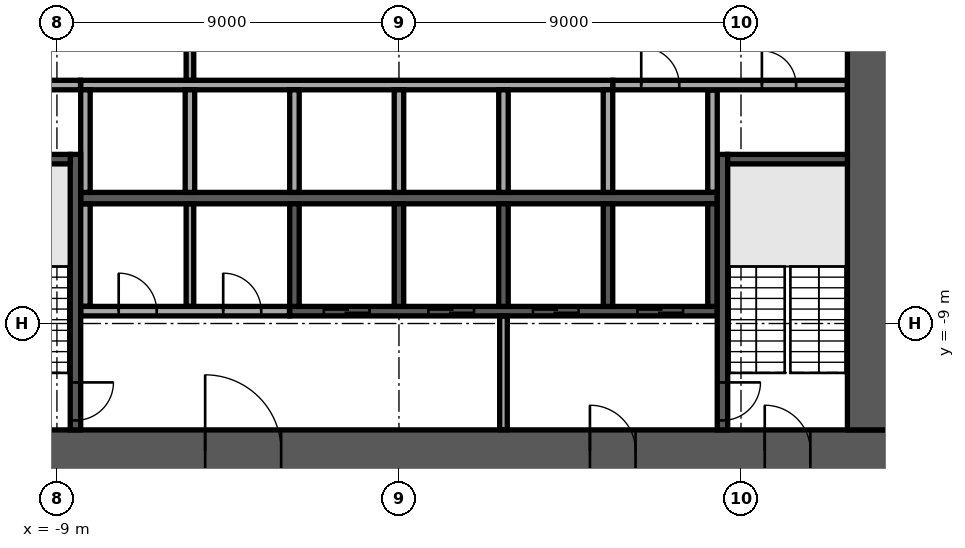
"""IFC4 building model, lengths in metres.
Left out: names, types, materials, properties, quantities, classifications, styles, units other than length and angle.
Written with IfcOpenShell. Run it as: python <this file> out.ifc"""

import sys

from ifc_helpers import new_model, si_unit, direction, frame, frame_2d, origin, place, context, subcontext, project, spatial, rectangle, extrude, element, fill, save


model = new_model("IFC4")
c1 = context("Model", 3, precision=1e-05, world=origin(), true_north=direction((0.0, 1.0)))
c2 = subcontext(c1, "Body", "Model", "MODEL_VIEW")
j1 = project(units=[si_unit("LENGTHUNIT", "METRE"), si_unit("PLANEANGLEUNIT", "RADIAN")], contexts=[c1])
p1 = place(None, origin())
s1 = spatial("IfcSite", under=j1, at=p1, CompositionType="ELEMENT")
p2 = place(p1, origin())
s2 = spatial("IfcBuilding", under=s1, at=p2, CompositionType="ELEMENT")
p3 = place(p2, frame((0.0, 0.0, 86.1)))
s3 = spatial("IfcBuildingStorey", under=s2, at=p3, CompositionType="ELEMENT", Elevation=86.1)
p4 = place(p3, frame((-12.9, -12.35, 0.0), z_axis=(0.0, 0.0, 1.0), x_axis=(1.0, 0.0, 0.0)))
e1 = element("IfcWall", 1, at=p4, inside=s3, PredefinedType="SHEAR", context=c2, shape_type="SweptSolid", body=[
    extrude(rectangle(XDim=25.8, YDim=1.1, at=frame_2d((12.9, 0.0))), origin(), (0.0, 0.0, 1.0), 3.58),
])
p5 = place(p4, frame((7.8, 0.0, 0.0)))
e2 = element("IfcOpeningElement", 2, at=p5, cuts=e1, PredefinedType="OPENING", context=c2, shape_type="SweptSolid", body=[
    extrude(rectangle(XDim=2.0, YDim=2.1, at=frame_2d((1.0, 1.05))), frame((0.0, 0.56, 0.0), z_axis=(0.0, -1.0, 0.0), x_axis=(1.0, 0.0, 0.0)), (0.0, 0.0, 1.0), 1.12),
])
p6 = place(p4, frame((17.925, 0.0, 0.0)))
e3 = element("IfcOpeningElement", 3, at=p6, cuts=e1, PredefinedType="OPENING", context=c2, shape_type="SweptSolid", body=[
    extrude(rectangle(XDim=1.2, YDim=2.1, at=frame_2d((0.6, 1.05))), frame((0.0, 0.56, 0.0), z_axis=(0.0, -1.0, 0.0), x_axis=(1.0, 0.0, 0.0)), (0.0, 0.0, 1.0), 1.12),
])
p7 = place(p4, frame((2.075, 0.0, 0.0)))
e4 = element("IfcOpeningElement", 4, at=p7, cuts=e1, PredefinedType="OPENING", context=c2, shape_type="SweptSolid", body=[
    extrude(rectangle(XDim=1.2, YDim=2.1, at=frame_2d((0.6, 1.05))), frame((0.0, 0.56, 0.0), z_axis=(0.0, -1.0, 0.0), x_axis=(1.0, 0.0, 0.0)), (0.0, 0.0, 1.0), 1.12),
])
p8 = place(p4, frame((22.525, 0.0, 0.0)))
e5 = element("IfcOpeningElement", 5, at=p8, cuts=e1, PredefinedType="OPENING", context=c2, shape_type="SweptSolid", body=[
    extrude(rectangle(XDim=1.2, YDim=2.1, at=frame_2d((0.6, 1.05))), frame((0.0, 0.56, 0.0), z_axis=(0.0, -1.0, 0.0), x_axis=(1.0, 0.0, 0.0)), (0.0, 0.0, 1.0), 1.12),
])
p9 = place(p3, frame((12.35, -11.8, 0.0), z_axis=(0.0, 0.0, 1.0), x_axis=(0.0, 1.0, 0.0)))
e6 = element("IfcWall", 6, at=p9, inside=s3, PredefinedType="SHEAR", context=c2, shape_type="SweptSolid", body=[
    extrude(rectangle(XDim=23.6, YDim=1.1, at=frame_2d((11.8, 0.0))), origin(), (0.0, 0.0, 1.0), 3.58),
])
p10 = place(p9, frame((10.6, 0.0, 0.0)))
e7 = element("IfcOpeningElement", 7, at=p10, cuts=e6, PredefinedType="OPENING", context=c2, shape_type="SweptSolid", body=[
    extrude(rectangle(XDim=2.4, YDim=2.4, at=frame_2d((1.2, 1.2))), frame((0.0, 0.56, 0.0), z_axis=(0.0, -1.0, 0.0), x_axis=(1.0, 0.0, 0.0)), (0.0, 0.0, 1.0), 1.12),
])
p11 = place(p3, frame((-8.375, -5.7, 0.0), z_axis=(0.0, 0.0, 1.0), x_axis=(1.0, 0.0, 0.0)))
e8 = element("IfcWall", 8, at=p11, inside=s3, PredefinedType="SOLIDWALL", context=c2, shape_type="SweptSolid", body=[
    extrude(rectangle(XDim=16.75, YDim=0.3, at=frame_2d((8.375, 0.0))), origin(), (0.0, 0.0, 1.0), 3.58),
])
p12 = place(p3, frame((-8.375, -2.725, 0.0), z_axis=(0.0, 0.0, 1.0), x_axis=(1.0, 0.0, 0.0)))
e9 = element("IfcWall", 9, at=p12, inside=s3, PredefinedType="SOLIDWALL", context=c2, shape_type="SweptSolid", body=[
    extrude(rectangle(XDim=14.0, YDim=0.25, at=frame_2d((7.0, 0.0))), origin(), (0.0, 0.0, 1.0), 3.58),
])
for number, where, z_axis, x_axis in (
    (10, (-8.25, -5.55, 0.0), (0.0, 0.0, 1.0), (0.0, 1.0, 0.0)),
    (11, (-5.5, -5.55, 0.0), (0.0, 0.0, 1.0), (0.0, 1.0, 0.0)),
    (12, (-2.75, -5.55, 0.0), (0.0, 0.0, 1.0), (0.0, 1.0, 0.0)),
    (13, (0.0, -5.55, 0.0), (0.0, 0.0, 1.0), (0.0, 1.0, 0.0)),
    (14, (2.75, -5.55, 0.0), (0.0, 0.0, 1.0), (0.0, 1.0, 0.0)),
    (15, (5.5, -5.55, 0.0), (0.0, 0.0, 1.0), (0.0, 1.0, 0.0)),
):
    element("IfcWall", number, at=place(p3, frame(where, z_axis=z_axis, x_axis=x_axis)), inside=s3, PredefinedType="SOLIDWALL", context=c2, shape_type="SweptSolid", body=[
        extrude(rectangle(XDim=2.7, YDim=0.25, at=frame_2d((1.35, 0.0))), origin(), (0.0, 0.0, 1.0), 3.58),
    ])
p13 = place(p3, frame((-2.875, -8.675, 0.0), z_axis=(0.0, 0.0, 1.0), x_axis=(1.0, 0.0, 0.0)))
e16 = element("IfcWall", 16, at=p13, inside=s3, PredefinedType="SOLIDWALL", context=c2, shape_type="SweptSolid", body=[
    extrude(rectangle(XDim=11.25, YDim=0.25, at=frame_2d((5.625, 0.0))), origin(), (0.0, 0.0, 1.0), 3.58),
])
p14 = place(p13, frame((0.9, 0.0, 0.0)))
e17 = element("IfcOpeningElement", 17, at=p14, cuts=e16, PredefinedType="OPENING", context=c2, shape_type="SweptSolid", body=[
    extrude(rectangle(XDim=1.2, YDim=2.1, at=frame_2d((0.6, 1.05))), frame((0.0, 0.135, 0.0), z_axis=(0.0, -1.0, 0.0), x_axis=(1.0, 0.0, 0.0)), (0.0, 0.0, 1.0), 0.27),
])
p15 = place(p13, frame((3.65, 0.0, 0.0)))
e18 = element("IfcOpeningElement", 18, at=p15, cuts=e16, PredefinedType="OPENING", context=c2, shape_type="SweptSolid", body=[
    extrude(rectangle(XDim=1.2, YDim=2.1, at=frame_2d((0.6, 1.05))), frame((0.0, 0.135, 0.0), z_axis=(0.0, -1.0, 0.0), x_axis=(1.0, 0.0, 0.0)), (0.0, 0.0, 1.0), 0.27),
])
p16 = place(p13, frame((6.4, 0.0, 0.0)))
e19 = element("IfcOpeningElement", 19, at=p16, cuts=e16, PredefinedType="OPENING", context=c2, shape_type="SweptSolid", body=[
    extrude(rectangle(XDim=1.2, YDim=2.1, at=frame_2d((0.6, 1.05))), frame((0.0, 0.135, 0.0), z_axis=(0.0, -1.0, 0.0), x_axis=(1.0, 0.0, 0.0)), (0.0, 0.0, 1.0), 0.27),
])
p17 = place(p13, frame((9.15, 0.0, 0.0)))
e20 = element("IfcOpeningElement", 20, at=p17, cuts=e16, PredefinedType="OPENING", context=c2, shape_type="SweptSolid", body=[
    extrude(rectangle(XDim=1.2, YDim=2.1, at=frame_2d((0.6, 1.05))), frame((0.0, 0.135, 0.0), z_axis=(0.0, -1.0, 0.0), x_axis=(1.0, 0.0, 0.0)), (0.0, 0.0, 1.0), 0.27),
])
for number, where, z_axis, x_axis in (
    (21, (-2.75, -8.55, 0.0), (0.0, 0.0, 1.0), (0.0, 1.0, 0.0)),
    (22, (0.0, -8.55, 0.0), (0.0, 0.0, 1.0), (0.0, 1.0, 0.0)),
    (23, (2.75, -8.55, 0.0), (0.0, 0.0, 1.0), (0.0, 1.0, 0.0)),
    (24, (5.5, -8.55, 0.0), (0.0, 0.0, 1.0), (0.0, 1.0, 0.0)),
    (25, (8.25, -8.55, 0.0), (0.0, 0.0, 1.0), (0.0, 1.0, 0.0)),
):
    element("IfcWall", number, at=place(p3, frame(where, z_axis=z_axis, x_axis=x_axis)), inside=s3, PredefinedType="SOLIDWALL", context=c2, shape_type="SweptSolid", body=[
        extrude(rectangle(XDim=2.7, YDim=0.25, at=frame_2d((1.35, 0.0))), origin(), (0.0, 0.0, 1.0), 3.58),
    ])
p18 = place(p3, frame((-8.512, -4.55, 0.0), z_axis=(0.0, 0.0, 1.0), x_axis=(0.0, -1.0, 0.0)))
e26 = element("IfcWall", 26, at=p18, inside=s3, PredefinedType="SOLIDWALL", context=c2, shape_type="SweptSolid", body=[
    extrude(rectangle(XDim=7.25, YDim=0.275, at=frame_2d((3.625, 0.0))), origin(), (0.0, 0.0, 1.0), 3.58),
])
p19 = place(p18, frame((6.0, 0.0, 0.0)))
e27 = element("IfcOpeningElement", 27, at=p19, cuts=e26, PredefinedType="OPENING", context=c2, shape_type="SweptSolid", body=[
    extrude(rectangle(XDim=1.0, YDim=2.1, at=frame_2d((0.5, 1.05))), frame((0.0, 0.147, 0.0), z_axis=(0.0, -1.0, 0.0), x_axis=(1.0, 0.0, 0.0)), (0.0, 0.0, 1.0), 0.295),
])
p20 = place(p3, frame((-8.65, -4.675, 0.0), z_axis=(0.0, 0.0, 1.0), x_axis=(-1.0, 0.0, 0.0)))
e28 = element("IfcWall", 28, at=p20, inside=s3, PredefinedType="SOLIDWALL", context=c2, shape_type="SweptSolid", body=[
    extrude(rectangle(XDim=3.15, YDim=0.25, at=frame_2d((1.575, 0.0))), origin(), (0.0, 0.0, 1.0), 3.58),
])
p21 = place(p3, frame((8.512, -4.55, 0.0), z_axis=(0.0, 0.0, 1.0), x_axis=(0.0, -1.0, 0.0)))
e29 = element("IfcWall", 29, at=p21, inside=s3, PredefinedType="SOLIDWALL", context=c2, shape_type="SweptSolid", body=[
    extrude(rectangle(XDim=7.25, YDim=0.275, at=frame_2d((3.625, 0.0))), origin(), (0.0, 0.0, 1.0), 3.58),
])
p22 = place(p21, frame((6.0, 0.0, 0.0)))
e30 = element("IfcOpeningElement", 30, at=p22, cuts=e29, PredefinedType="OPENING", context=c2, shape_type="SweptSolid", body=[
    extrude(rectangle(XDim=1.0, YDim=2.1, at=frame_2d((0.5, 1.05))), frame((0.0, 0.147, 0.0), z_axis=(0.0, -1.0, 0.0), x_axis=(1.0, 0.0, 0.0)), (0.0, 0.0, 1.0), 0.295),
])
p23 = place(p3, frame((8.65, -4.675, 0.0), z_axis=(0.0, 0.0, 1.0), x_axis=(1.0, 0.0, 0.0)))
e31 = element("IfcWall", 31, at=p23, inside=s3, PredefinedType="SOLIDWALL", context=c2, shape_type="SweptSolid", body=[
    extrude(rectangle(XDim=3.15, YDim=0.25, at=frame_2d((1.575, 0.0))), origin(), (0.0, 0.0, 1.0), 3.58),
])
p24 = place(p3, frame((2.75, -11.795, 0.0), z_axis=(0.0, 0.0, 1.0), x_axis=(0.0, 1.0, 0.0)))
e32 = element("IfcWall", 32, at=p24, inside=s3, PredefinedType="PARTITIONING", context=c2, shape_type="SweptSolid", body=[
    extrude(rectangle(XDim=2.99, YDim=0.2, at=frame_2d((1.495, 0.0))), origin(), (0.0, 0.0, 1.0), 3.58),
])
p25 = place(p3, frame((-8.37, -8.675, 0.0), z_axis=(0.0, 0.0, 1.0), x_axis=(1.0, 0.0, 0.0)))
e33 = element("IfcWall", 33, at=p25, inside=s3, PredefinedType="PARTITIONING", context=c2, shape_type="SweptSolid", body=[
    extrude(rectangle(XDim=5.49, YDim=0.25, at=frame_2d((2.745, 0.0))), origin(), (0.0, 0.0, 1.0), 3.58),
])
p26 = place(p25, frame((0.995, 0.0, 0.0)))
e34 = element("IfcOpeningElement", 34, at=p26, cuts=e33, PredefinedType="OPENING", context=c2, shape_type="SweptSolid", body=[
    extrude(rectangle(XDim=1.0, YDim=2.1, at=frame_2d((0.5, 1.05))), frame((0.0, 0.135, 0.0), z_axis=(0.0, -1.0, 0.0), x_axis=(1.0, 0.0, 0.0)), (0.0, 0.0, 1.0), 0.27),
])
p27 = place(p25, frame((3.745, 0.0, 0.0)))
e35 = element("IfcOpeningElement", 35, at=p27, cuts=e33, PredefinedType="OPENING", context=c2, shape_type="SweptSolid", body=[
    extrude(rectangle(XDim=1.0, YDim=2.1, at=frame_2d((0.5, 1.05))), frame((0.0, 0.135, 0.0), z_axis=(0.0, -1.0, 0.0), x_axis=(1.0, 0.0, 0.0)), (0.0, 0.0, 1.0), 0.27),
])
p28 = place(p3, frame((-8.25, -8.545, 0.0), z_axis=(0.0, 0.0, 1.0), x_axis=(0.0, 1.0, 0.0)))
e36 = element("IfcWall", 36, at=p28, inside=s3, PredefinedType="PARTITIONING", context=c2, shape_type="SweptSolid", body=[
    extrude(rectangle(XDim=2.69, YDim=0.25, at=frame_2d((1.345, 0.0))), origin(), (0.0, 0.0, 1.0), 3.58),
])
p29 = place(p3, frame((-5.5, -8.545, 0.0), z_axis=(0.0, 0.0, 1.0), x_axis=(0.0, 1.0, 0.0)))
e37 = element("IfcWall", 37, at=p29, inside=s3, PredefinedType="PARTITIONING", context=c2, shape_type="SweptSolid", body=[
    extrude(rectangle(XDim=2.69, YDim=0.2, at=frame_2d((1.345, 0.0))), origin(), (0.0, 0.0, 1.0), 3.58),
])
p30 = place(p3, frame((8.25, -5.545, 0.0), z_axis=(0.0, 0.0, 1.0), x_axis=(0.0, 1.0, 0.0)))
e38 = element("IfcWall", 38, at=p30, inside=s3, PredefinedType="PARTITIONING", context=c2, shape_type="SweptSolid", body=[
    extrude(rectangle(XDim=2.69, YDim=0.25, at=frame_2d((1.345, 0.0))), origin(), (0.0, 0.0, 1.0), 3.58),
])
p31 = place(p3, frame((-11.795, -2.725, 0.0), z_axis=(0.0, 0.0, 1.0), x_axis=(1.0, 0.0, 0.0)))
e39 = element("IfcWall", 39, at=p31, inside=s3, PredefinedType="PARTITIONING", context=c2, shape_type="SweptSolid", body=[
    extrude(rectangle(XDim=3.415, YDim=0.25, at=frame_2d((1.708, 0.0))), origin(), (0.0, 0.0, 1.0), 3.58),
])
p32 = place(p31, frame((1.295, 0.0, 0.0)))
e40 = element("IfcOpeningElement", 40, at=p32, cuts=e39, PredefinedType="OPENING", context=c2, shape_type="SweptSolid", body=[
    extrude(rectangle(XDim=1.0, YDim=2.1, at=frame_2d((0.5, 1.05))), frame((0.0, 0.135, 0.0), z_axis=(0.0, -1.0, 0.0), x_axis=(1.0, 0.0, 0.0)), (0.0, 0.0, 1.0), 0.27),
])
p33 = place(p3, frame((5.63, -2.725, 0.0), z_axis=(0.0, 0.0, 1.0), x_axis=(1.0, 0.0, 0.0)))
e41 = element("IfcWall", 41, at=p33, inside=s3, PredefinedType="PARTITIONING", context=c2, shape_type="SweptSolid", body=[
    extrude(rectangle(XDim=6.165, YDim=0.25, at=frame_2d((3.083, 0.0))), origin(), (0.0, 0.0, 1.0), 3.58),
])
p34 = place(p33, frame((0.745, 0.0, 0.0)))
e42 = element("IfcOpeningElement", 42, at=p34, cuts=e41, PredefinedType="OPENING", context=c2, shape_type="SweptSolid", body=[
    extrude(rectangle(XDim=1.0, YDim=2.1, at=frame_2d((0.5, 1.05))), frame((0.0, 0.135, 0.0), z_axis=(0.0, -1.0, 0.0), x_axis=(1.0, 0.0, 0.0)), (0.0, 0.0, 1.0), 0.27),
])
p35 = place(p33, frame((3.92, 0.0, 0.0)))
e43 = element("IfcOpeningElement", 43, at=p35, cuts=e41, PredefinedType="OPENING", context=c2, shape_type="SweptSolid", body=[
    extrude(rectangle(XDim=0.9, YDim=2.1, at=frame_2d((0.45, 1.05))), frame((0.0, 0.135, 0.0), z_axis=(0.0, -1.0, 0.0), x_axis=(1.0, 0.0, 0.0)), (0.0, 0.0, 1.0), 0.27),
])
p36 = place(p3, frame((-5.5, -2.595, 0.0), z_axis=(0.0, 0.0, 1.0), x_axis=(0.0, 1.0, 0.0)))
e44 = element("IfcWall", 44, at=p36, inside=s3, PredefinedType="PARTITIONING", context=c2, shape_type="SweptSolid", body=[
    extrude(rectangle(XDim=5.19, YDim=0.2, at=frame_2d((2.595, 0.0))), origin(), (0.0, 0.0, 1.0), 3.58),
])
p37 = place(p36, frame((1.395, 0.0, 0.0)))
e45 = element("IfcOpeningElement", 45, at=p37, cuts=e44, PredefinedType="OPENING", context=c2, shape_type="SweptSolid", body=[
    extrude(rectangle(XDim=2.4, YDim=2.4, at=frame_2d((1.2, 1.2))), frame((0.0, 0.11, 0.0), z_axis=(0.0, -1.0, 0.0), x_axis=(1.0, 0.0, 0.0)), (0.0, 0.0, 1.0), 0.22),
])
p38 = place(p5, origin())
e46 = element("IfcDoor", 46, at=p38, inside=s3, OperationType="SINGLE_SWING_LEFT", PredefinedType="DOOR", context=c2, shape_type="SweptSolid", body=[
    extrude(rectangle(XDim=2.0, YDim=2.1, at=frame_2d((1.0, 1.05))), frame((0.0, 0.025, 0.0), z_axis=(0.0, -1.0, 0.0), x_axis=(1.0, 0.0, 0.0)), (0.0, 0.0, 1.0), 0.05),
])
fill(e2, e46)
p39 = place(p6, origin())
e47 = element("IfcDoor", 47, at=p39, inside=s3, OperationType="SINGLE_SWING_LEFT", PredefinedType="DOOR", context=c2, shape_type="SweptSolid", body=[
    extrude(rectangle(XDim=1.2, YDim=2.1, at=frame_2d((0.6, 1.05))), frame((0.0, 0.025, 0.0), z_axis=(0.0, -1.0, 0.0), x_axis=(1.0, 0.0, 0.0)), (0.0, 0.0, 1.0), 0.05),
])
fill(e3, e47)
p40 = place(p8, origin())
e48 = element("IfcDoor", 48, at=p40, inside=s3, OperationType="SINGLE_SWING_LEFT", PredefinedType="DOOR", context=c2, shape_type="SweptSolid", body=[
    extrude(rectangle(XDim=1.2, YDim=2.1, at=frame_2d((0.6, 1.05))), frame((0.0, 0.025, 0.0), z_axis=(0.0, -1.0, 0.0), x_axis=(1.0, 0.0, 0.0)), (0.0, 0.0, 1.0), 0.05),
])
fill(e5, e48)
p41 = place(p14, origin())
e49 = element("IfcDoor", 49, at=p41, inside=s3, OperationType="DOUBLE_DOOR_SLIDING", PredefinedType="DOOR", context=c2, shape_type="SweptSolid", body=[
    extrude(rectangle(XDim=1.2, YDim=2.1, at=frame_2d((0.6, 1.05))), frame((0.0, 0.025, 0.0), z_axis=(0.0, -1.0, 0.0), x_axis=(1.0, 0.0, 0.0)), (0.0, 0.0, 1.0), 0.05),
])
fill(e17, e49)
p42 = place(p15, origin())
e50 = element("IfcDoor", 50, at=p42, inside=s3, OperationType="DOUBLE_DOOR_SLIDING", PredefinedType="DOOR", context=c2, shape_type="SweptSolid", body=[
    extrude(rectangle(XDim=1.2, YDim=2.1, at=frame_2d((0.6, 1.05))), frame((0.0, 0.025, 0.0), z_axis=(0.0, -1.0, 0.0), x_axis=(1.0, 0.0, 0.0)), (0.0, 0.0, 1.0), 0.05),
])
fill(e18, e50)
p43 = place(p16, origin())
e51 = element("IfcDoor", 51, at=p43, inside=s3, OperationType="DOUBLE_DOOR_SLIDING", PredefinedType="DOOR", context=c2, shape_type="SweptSolid", body=[
    extrude(rectangle(XDim=1.2, YDim=2.1, at=frame_2d((0.6, 1.05))), frame((0.0, 0.025, 0.0), z_axis=(0.0, -1.0, 0.0), x_axis=(1.0, 0.0, 0.0)), (0.0, 0.0, 1.0), 0.05),
])
fill(e19, e51)
p44 = place(p17, origin())
e52 = element("IfcDoor", 52, at=p44, inside=s3, OperationType="DOUBLE_DOOR_SLIDING", PredefinedType="DOOR", context=c2, shape_type="SweptSolid", body=[
    extrude(rectangle(XDim=1.2, YDim=2.1, at=frame_2d((0.6, 1.05))), frame((0.0, 0.025, 0.0), z_axis=(0.0, -1.0, 0.0), x_axis=(1.0, 0.0, 0.0)), (0.0, 0.0, 1.0), 0.05),
])
fill(e20, e52)
p45 = place(p19, origin())
e53 = element("IfcDoor", 53, at=p45, inside=s3, OperationType="SINGLE_SWING_LEFT", PredefinedType="DOOR", context=c2, shape_type="SweptSolid", body=[
    extrude(rectangle(XDim=1.0, YDim=2.1, at=frame_2d((0.5, 1.05))), frame((0.0, 0.025, 0.0), z_axis=(0.0, -1.0, 0.0), x_axis=(1.0, 0.0, 0.0)), (0.0, 0.0, 1.0), 0.05),
])
fill(e27, e53)
p46 = place(p22, origin())
e54 = element("IfcDoor", 54, at=p46, inside=s3, OperationType="SINGLE_SWING_LEFT", PredefinedType="DOOR", context=c2, shape_type="SweptSolid", body=[
    extrude(rectangle(XDim=1.0, YDim=2.1, at=frame_2d((0.5, 1.05))), frame((0.0, 0.025, 0.0), z_axis=(0.0, -1.0, 0.0), x_axis=(1.0, 0.0, 0.0)), (0.0, 0.0, 1.0), 0.05),
])
fill(e30, e54)
p47 = place(p26, origin())
e55 = element("IfcDoor", 55, at=p47, inside=s3, OperationType="SINGLE_SWING_RIGHT", PredefinedType="DOOR", context=c2, shape_type="SweptSolid", body=[
    extrude(rectangle(XDim=1.0, YDim=2.1, at=frame_2d((0.5, 1.05))), frame((0.0, 0.025, 0.0), z_axis=(0.0, -1.0, 0.0), x_axis=(1.0, 0.0, 0.0)), (0.0, 0.0, 1.0), 0.05),
])
fill(e34, e55)
p48 = place(p27, origin())
e56 = element("IfcDoor", 56, at=p48, inside=s3, OperationType="SINGLE_SWING_RIGHT", PredefinedType="DOOR", context=c2, shape_type="SweptSolid", body=[
    extrude(rectangle(XDim=1.0, YDim=2.1, at=frame_2d((0.5, 1.05))), frame((0.0, 0.025, 0.0), z_axis=(0.0, -1.0, 0.0), x_axis=(1.0, 0.0, 0.0)), (0.0, 0.0, 1.0), 0.05),
])
fill(e35, e56)
p49 = place(p34, origin())
e57 = element("IfcDoor", 57, at=p49, inside=s3, OperationType="SINGLE_SWING_RIGHT", PredefinedType="DOOR", context=c2, shape_type="SweptSolid", body=[
    extrude(rectangle(XDim=1.0, YDim=2.1, at=frame_2d((0.5, 1.05))), frame((0.0, 0.025, 0.0), z_axis=(0.0, -1.0, 0.0), x_axis=(1.0, 0.0, 0.0)), (0.0, 0.0, 1.0), 0.05),
])
fill(e42, e57)
p50 = place(p35, origin())
e58 = element("IfcDoor", 58, at=p50, inside=s3, OperationType="SINGLE_SWING_RIGHT", PredefinedType="DOOR", context=c2, shape_type="SweptSolid", body=[
    extrude(rectangle(XDim=0.9, YDim=2.1, at=frame_2d((0.45, 1.05))), frame((0.0, 0.025, 0.0), z_axis=(0.0, -1.0, 0.0), x_axis=(1.0, 0.0, 0.0)), (0.0, 0.0, 1.0), 0.05),
])
fill(e43, e58)
save(model, sys.argv[1])
